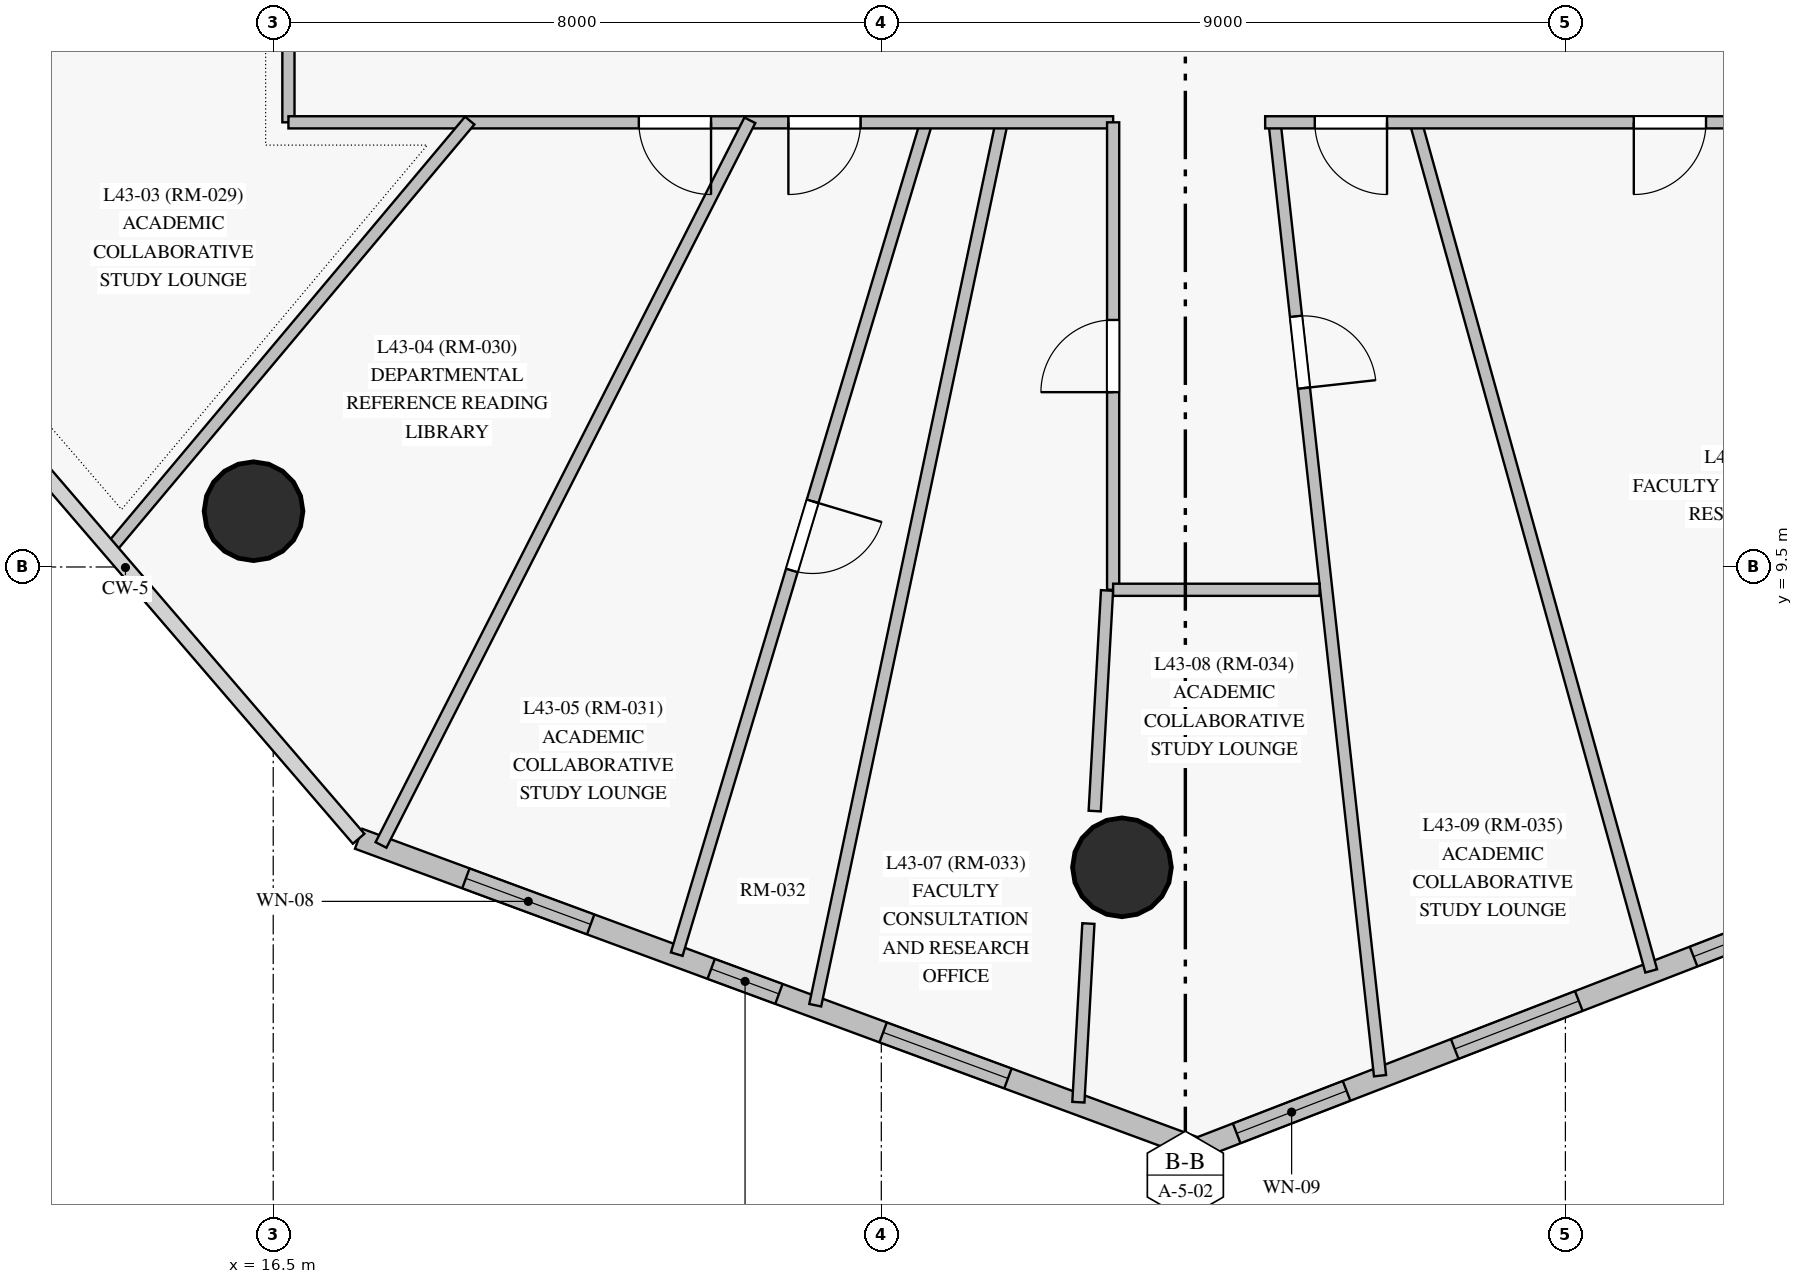
"""IFC4 building model, lengths in metres.
Left out: names, types, materials, properties, quantities, classifications, styles, units other than length and angle.
Written with IfcOpenShell. Run it as: python <this file> out.ifc"""

import sys

from ifc_helpers import new_model, si_unit, direction, frame, frame_2d, origin, origin_with_axes, origin_2d, place, context, subcontext, project, spatial, rectangle, circle, extrude, source, transform, mapped, element, fill, save


model = new_model("IFC4")
c1 = context("Model", 3, precision=1e-05, world=origin(), true_north=direction((0.0, 1.0)))
c2 = subcontext(c1, "Body", "Model", "MODEL_VIEW")
j1 = project(units=[si_unit("LENGTHUNIT", "METRE"), si_unit("PLANEANGLEUNIT", "RADIAN")], contexts=[c1])
p1 = place(None, origin())
s1 = spatial("IfcSite", under=j1, at=p1, CompositionType="ELEMENT")
p2 = place(p1, origin())
s2 = spatial("IfcBuilding", under=s1, at=p2, CompositionType="ELEMENT")
p3 = place(p2, frame((0.0, 0.0, 152.55)))
s3 = spatial("IfcBuildingStorey", under=s2, at=p3, CompositionType="ELEMENT", Elevation=152.55)
m1 = source(origin_with_axes(), c2, "Body", "SweptSolid", [
    extrude(circle(Radius=0.65, at=origin_2d()), origin(), (0.0, 0.0, 1.0), 4.0),
])
for number, where, z_axis, x_axis in (
    (1, (16.241, 10.234, 0.0), (0.0, 0.0, 1.0), (1.0, 0.0, 0.0)),
    (2, (27.666, 5.549, 0.0), (0.0, 0.0, 1.0), (1.0, 0.0, 0.0)),
):
    element("IfcColumn", number, at=place(p3, frame(where, z_axis=z_axis, x_axis=x_axis)), inside=s3, PredefinedType="COLUMN", context=c2, shape_type="MappedRepresentation", body=[
        mapped(m1, transform((0.0, 0.0, 0.0), scale=1.0)),
    ])
p4 = place(p3, frame((17.624, 5.925, 0.0), z_axis=(0.0, 0.0, 1.0), x_axis=(0.938113692387, -0.346327446436, 0.0)))
e3 = element("IfcWall", 3, at=p4, inside=s3, PredefinedType="SOLIDWALL", context=c2, shape_type="SweptSolid", body=[
    extrude(rectangle(XDim=11.765, YDim=0.28, at=frame_2d((5.883, 0.0))), origin(), (0.0, 0.0, 1.0), 3.775),
])
p5 = place(p4, frame((1.504, 0.0, 0.85)))
e4 = element("IfcOpeningElement", 4, at=p5, cuts=e3, PredefinedType="OPENING", context=c2, shape_type="SweptSolid", body=[
    extrude(rectangle(XDim=1.75, YDim=1.65, at=frame_2d((0.875, 0.825))), frame((0.0, 0.15, 0.0), z_axis=(0.0, -1.0, 0.0), x_axis=(1.0, 0.0, 0.0)), (0.0, 0.0, 1.0), 0.3),
])
p6 = place(p4, frame((4.944, 0.0, 0.85)))
e5 = element("IfcOpeningElement", 5, at=p6, cuts=e3, PredefinedType="OPENING", context=c2, shape_type="SweptSolid", body=[
    extrude(rectangle(XDim=0.95, YDim=1.5, at=frame_2d((0.475, 0.75))), frame((0.0, 0.15, 0.0), z_axis=(0.0, -1.0, 0.0), x_axis=(1.0, 0.0, 0.0)), (0.0, 0.0, 1.0), 0.3),
])
p7 = place(p4, frame((7.356, 0.0, 0.85)))
e6 = element("IfcOpeningElement", 6, at=p7, cuts=e3, PredefinedType="OPENING", context=c2, shape_type="SweptSolid", body=[
    extrude(rectangle(XDim=1.75, YDim=1.65, at=frame_2d((0.875, 0.825))), frame((0.0, 0.15, 0.0), z_axis=(0.0, -1.0, 0.0), x_axis=(1.0, 0.0, 0.0)), (0.0, 0.0, 1.0), 0.3),
])
p8 = place(p3, frame((28.661, 1.85, 0.0), z_axis=(0.0, 0.0, 1.0), x_axis=(0.93264769039, 0.360788422223, 0.0)))
e7 = element("IfcWall", 7, at=p8, inside=s3, PredefinedType="SOLIDWALL", context=c2, shape_type="SweptSolid", body=[
    extrude(rectangle(XDim=9.391, YDim=0.28, at=frame_2d((4.696, 0.0))), origin(), (0.0, 0.0, 1.0), 3.775),
])
p9 = place(p8, frame((0.552, 0.0, 0.85)))
e8 = element("IfcOpeningElement", 8, at=p9, cuts=e7, PredefinedType="OPENING", context=c2, shape_type="SweptSolid", body=[
    extrude(rectangle(XDim=1.55, YDim=1.65, at=frame_2d((0.775, 0.825))), frame((0.0, 0.15, 0.0), z_axis=(0.0, -1.0, 0.0), x_axis=(1.0, 0.0, 0.0)), (0.0, 0.0, 1.0), 0.3),
])
p10 = place(p8, frame((3.627, 0.0, 0.85)))
e9 = element("IfcOpeningElement", 9, at=p10, cuts=e7, PredefinedType="OPENING", context=c2, shape_type="SweptSolid", body=[
    extrude(rectangle(XDim=1.75, YDim=1.65, at=frame_2d((0.875, 0.825))), frame((0.0, 0.15, 0.0), z_axis=(0.0, -1.0, 0.0), x_axis=(1.0, 0.0, 0.0)), (0.0, 0.0, 1.0), 0.3),
])
p11 = place(p8, frame((6.997, 0.0, 0.85)))
e10 = element("IfcOpeningElement", 10, at=p11, cuts=e7, PredefinedType="OPENING", context=c2, shape_type="SweptSolid", body=[
    extrude(rectangle(XDim=1.75, YDim=1.65, at=frame_2d((0.875, 0.825))), frame((0.0, 0.15, 0.0), z_axis=(0.0, -1.0, 0.0), x_axis=(1.0, 0.0, 0.0)), (0.0, 0.0, 1.0), 0.3),
])
p12 = place(p3, frame((16.7, 15.35, 0.0), z_axis=(0.0, 0.0, 1.0), x_axis=(0.0, 1.0, 0.0)))
e11 = element("IfcWall", 11, at=p12, inside=s3, PredefinedType="PARTITIONING", context=c2, shape_type="SweptSolid", body=[
    extrude(rectangle(XDim=22.3, YDim=0.16, at=frame_2d((11.15, 0.0))), origin(), (0.0, 0.0, 1.0), 2.975),
])
p13 = place(p12, frame((7.33, 0.0, 0.0)))
e12 = element("IfcOpeningElement", 12, at=p13, cuts=e11, PredefinedType="OPENING", context=c2, shape_type="SweptSolid", body=[
    extrude(rectangle(XDim=0.95, YDim=2.15, at=frame_2d((0.475, 1.075))), frame((0.0, 0.09, 0.0), z_axis=(0.0, -1.0, 0.0), x_axis=(1.0, 0.0, 0.0)), (0.0, 0.0, 1.0), 0.18),
])
p14 = place(p12, frame((5.1, 0.0, 0.0)))
e13 = element("IfcOpeningElement", 13, at=p14, cuts=e11, PredefinedType="OPENING", context=c2, shape_type="SweptSolid", body=[
    extrude(rectangle(XDim=0.96, YDim=2.15, at=frame_2d((0.48, 1.075))), frame((0.0, 0.09, 0.0), z_axis=(0.0, -1.0, 0.0), x_axis=(1.0, 0.0, 0.0)), (0.0, 0.0, 1.0), 0.18),
])
p15 = place(p12, frame((1.328, 0.0, 0.0)))
e14 = element("IfcOpeningElement", 14, at=p15, cuts=e11, PredefinedType="OPENING", context=c2, shape_type="SweptSolid", body=[
    extrude(rectangle(XDim=0.95, YDim=2.15, at=frame_2d((0.475, 1.075))), frame((0.0, 0.09, 0.0), z_axis=(0.0, -1.0, 0.0), x_axis=(1.0, 0.0, 0.0)), (0.0, 0.0, 1.0), 0.18),
])
p16 = place(p12, frame((14.02, 0.0, 0.0)))
e15 = element("IfcOpeningElement", 15, at=p16, cuts=e11, PredefinedType="OPENING", context=c2, shape_type="SweptSolid", body=[
    extrude(rectangle(XDim=0.95, YDim=2.15, at=frame_2d((0.475, 1.075))), frame((0.0, 0.09, 0.0), z_axis=(0.0, -1.0, 0.0), x_axis=(1.0, 0.0, 0.0)), (0.0, 0.0, 1.0), 0.18),
])
p17 = place(p3, frame((29.67, 15.38, 0.0), z_axis=(0.0, 0.0, 1.0), x_axis=(0.109978172038, -0.993934002676, 0.0)))
e16 = element("IfcWall", 16, at=p17, inside=s3, PredefinedType="PARTITIONING", context=c2, shape_type="SweptSolid", body=[
    extrude(rectangle(XDim=12.649, YDim=0.16, at=frame_2d((6.324, 0.0))), origin(), (0.0, 0.0, 1.0), 3.775),
])
p18 = place(p17, frame((2.598, 0.0, 0.0)))
e17 = element("IfcOpeningElement", 17, at=p18, cuts=e16, PredefinedType="OPENING", context=c2, shape_type="SweptSolid", body=[
    extrude(rectangle(XDim=0.95, YDim=2.15, at=frame_2d((0.475, 1.075))), frame((0.0, 0.09, 0.0), z_axis=(0.0, -1.0, 0.0), x_axis=(1.0, 0.0, 0.0)), (0.0, 0.0, 1.0), 0.18),
])
p19 = place(p3, frame((26.09, 15.379, 0.0), z_axis=(0.0, 0.0, 1.0), x_axis=(-0.206629699735, -0.978419218529, 0.0)))
e18 = element("IfcWall", 18, at=p19, inside=s3, PredefinedType="PARTITIONING", context=c2, shape_type="SweptSolid", body=[
    extrude(rectangle(XDim=11.902, YDim=0.16, at=frame_2d((5.951, 0.0))), origin(), (0.0, 0.0, 1.0), 3.775),
])
p20 = place(p3, frame((31.523, 15.379, 0.0), z_axis=(0.0, 0.0, 1.0), x_axis=(0.267345748254, -0.963600669827, 0.0)))
e19 = element("IfcWall", 19, at=p20, inside=s3, PredefinedType="PARTITIONING", context=c2, shape_type="SweptSolid", body=[
    extrude(rectangle(XDim=11.616, YDim=0.16, at=frame_2d((5.808, 0.0))), origin(), (0.0, 0.0, 1.0), 3.775),
])
p21 = place(p3, frame((25.101, 15.379, 0.0), z_axis=(0.0, 0.0, 1.0), x_axis=(-0.287375259065, -0.957818072745, 0.0)))
e20 = element("IfcWall", 20, at=p21, inside=s3, PredefinedType="PARTITIONING", context=c2, shape_type="SweptSolid", body=[
    extrude(rectangle(XDim=11.455, YDim=0.16, at=frame_2d((5.728, 0.0))), origin(), (0.0, 0.0, 1.0), 3.775),
])
p22 = place(p21, frame((5.235, 0.0, 0.0)))
e21 = element("IfcOpeningElement", 21, at=p22, cuts=e20, PredefinedType="OPENING", context=c2, shape_type="SweptSolid", body=[
    extrude(rectangle(XDim=0.95, YDim=2.15, at=frame_2d((0.475, 1.075))), frame((0.0, 0.09, 0.0), z_axis=(0.0, -1.0, 0.0), x_axis=(1.0, 0.0, 0.0)), (0.0, 0.0, 1.0), 0.18),
])
p23 = place(p3, frame((27.55, 15.35, 0.0), z_axis=(0.0, 0.0, 1.0), x_axis=(-1.0, 0.0, 0.0)))
e22 = element("IfcWall", 22, at=p23, inside=s3, PredefinedType="PARTITIONING", context=c2, shape_type="SweptSolid", body=[
    extrude(rectangle(XDim=10.85, YDim=0.16, at=frame_2d((5.425, 0.0))), origin(), (0.0, 0.0, 1.0), 3.325),
])
p24 = place(p23, frame((5.29, 0.0, 0.0)))
e23 = element("IfcOpeningElement", 23, at=p24, cuts=e22, PredefinedType="OPENING", context=c2, shape_type="SweptSolid", body=[
    extrude(rectangle(XDim=0.95, YDim=2.15, at=frame_2d((0.475, 1.075))), frame((0.0, 0.09, 0.0), z_axis=(0.0, -1.0, 0.0), x_axis=(1.0, 0.0, 0.0)), (0.0, 0.0, 1.0), 0.18),
])
p25 = place(p23, frame((3.323, 0.0, 0.0)))
e24 = element("IfcOpeningElement", 24, at=p25, cuts=e22, PredefinedType="OPENING", context=c2, shape_type="SweptSolid", body=[
    extrude(rectangle(XDim=0.95, YDim=2.15, at=frame_2d((0.475, 1.075))), frame((0.0, 0.09, 0.0), z_axis=(0.0, -1.0, 0.0), x_axis=(1.0, 0.0, 0.0)), (0.0, 0.0, 1.0), 0.18),
])
p26 = place(p3, frame((22.771, 15.377, 0.0), z_axis=(0.0, 0.0, 1.0), x_axis=(-0.453637892893, -0.891186098484, 0.0)))
e25 = element("IfcWall", 25, at=p26, inside=s3, PredefinedType="PARTITIONING", context=c2, shape_type="SweptSolid", body=[
    extrude(rectangle(XDim=10.698, YDim=0.16, at=frame_2d((5.349, 0.0))), origin(), (0.0, 0.0, 1.0), 3.775),
])
p27 = place(p3, frame((40.2, 15.35, 0.0), z_axis=(0.0, 0.0, 1.0), x_axis=(-1.0, 0.0, 0.0)))
e26 = element("IfcWall", 26, at=p27, inside=s3, PredefinedType="PARTITIONING", context=c2, shape_type="SweptSolid", body=[
    extrude(rectangle(XDim=10.65, YDim=0.16, at=frame_2d((5.325, 0.0))), origin(), (0.0, 0.0, 1.0), 2.975),
])
p28 = place(p27, frame((9.047, 0.0, 0.0)))
e27 = element("IfcOpeningElement", 27, at=p28, cuts=e26, PredefinedType="OPENING", context=c2, shape_type="SweptSolid", body=[
    extrude(rectangle(XDim=0.95, YDim=2.15, at=frame_2d((0.475, 1.075))), frame((0.0, 0.09, 0.0), z_axis=(0.0, -1.0, 0.0), x_axis=(1.0, 0.0, 0.0)), (0.0, 0.0, 1.0), 0.18),
])
p29 = place(p27, frame((4.85, 0.0, 0.0)))
e28 = element("IfcOpeningElement", 28, at=p29, cuts=e26, PredefinedType="OPENING", context=c2, shape_type="SweptSolid", body=[
    extrude(rectangle(XDim=0.95, YDim=2.15, at=frame_2d((0.475, 1.075))), frame((0.0, 0.09, 0.0), z_axis=(0.0, -1.0, 0.0), x_axis=(1.0, 0.0, 0.0)), (0.0, 0.0, 1.0), 0.18),
])
p30 = place(p3, frame((19.085, 15.373, 0.0), z_axis=(0.0, 0.0, 1.0), x_axis=(-0.642788640308, -0.766043578324, 0.0)))
e29 = element("IfcWall", 29, at=p30, inside=s3, PredefinedType="PARTITIONING", context=c2, shape_type="SweptSolid", body=[
    extrude(rectangle(XDim=7.339, YDim=0.16, at=frame_2d((3.669, 0.0))), origin(), (0.0, 0.0, 1.0), 2.975),
])
p31 = place(p3, frame((16.726, 19.243, 0.0), z_axis=(0.0, 0.0, 1.0), x_axis=(-0.849038090378, -0.528331639301, 0.0)))
e30 = element("IfcWall", 30, at=p31, inside=s3, PredefinedType="PARTITIONING", context=c2, shape_type="SweptSolid", body=[
    extrude(rectangle(XDim=6.967, YDim=0.16, at=frame_2d((3.483, 0.0))), origin(), (0.0, 0.0, 1.0), 3.775),
])
p32 = place(p3, frame((27.55, 9.2, 0.0), z_axis=(0.0, 0.0, 1.0), x_axis=(0.0, 1.0, 0.0)))
e31 = element("IfcWall", 31, at=p32, inside=s3, PredefinedType="PARTITIONING", context=c2, shape_type="SweptSolid", body=[
    extrude(rectangle(XDim=6.15, YDim=0.16, at=frame_2d((3.075, 0.0))), origin(), (0.0, 0.0, 1.0), 2.975),
])
p33 = place(p32, frame((2.6, 0.0, 0.0)))
e32 = element("IfcOpeningElement", 32, at=p33, cuts=e31, PredefinedType="OPENING", context=c2, shape_type="SweptSolid", body=[
    extrude(rectangle(XDim=0.95, YDim=2.15, at=frame_2d((0.475, 1.075))), frame((0.0, 0.09, 0.0), z_axis=(0.0, -1.0, 0.0), x_axis=(1.0, 0.0, 0.0)), (0.0, 0.0, 1.0), 0.18),
])
p34 = place(p3, frame((27.47, 9.191, 0.0), z_axis=(0.0, 0.0, 1.0), x_axis=(-0.0559398618, -0.998434139972, 0.0)))
e33 = element("IfcWall", 33, at=p34, inside=s3, PredefinedType="PARTITIONING", context=c2, shape_type="SweptSolid", body=[
    extrude(rectangle(XDim=2.907, YDim=0.16, at=frame_2d((1.453, 0.0))), origin(), (0.0, 0.0, 1.0), 2.975),
])
p35 = place(p3, frame((27.224, 4.809, 0.0), z_axis=(0.0, 0.0, 1.0), x_axis=(-0.055900818541, -0.998436326706, 0.0)))
e34 = element("IfcWall", 34, at=p35, inside=s3, PredefinedType="PARTITIONING", context=c2, shape_type="SweptSolid", body=[
    extrude(rectangle(XDim=2.354, YDim=0.16, at=frame_2d((1.177, 0.0))), origin(), (0.0, 0.0, 1.0), 3.775),
])
p36 = place(p3, frame((30.266, 9.2, 0.0), z_axis=(0.0, 0.0, 1.0), x_axis=(-1.0, 0.0, 0.0)))
e35 = element("IfcWall", 35, at=p36, inside=s3, PredefinedType="PARTITIONING", context=c2, shape_type="SweptSolid", body=[
    extrude(rectangle(XDim=2.716, YDim=0.16, at=frame_2d((1.358, 0.0))), origin(), (0.0, 0.0, 1.0), 3.445),
])
m2 = source(origin_with_axes(), c2, "Body", "SweptSolid", [
    extrude(rectangle(XDim=1.75, YDim=1.65, at=frame_2d((0.875, 0.825))), frame((0.0, 0.03, 0.0), z_axis=(0.0, -1.0, 0.0), x_axis=(1.0, 0.0, 0.0)), (0.0, 0.0, 1.0), 0.06),
])
p37 = place(p5, origin())
e36 = element("IfcWindow", 36, at=p37, inside=s3, PartitioningType="SINGLE_PANEL", PredefinedType="WINDOW", context=c2, shape_type="MappedRepresentation", body=[
    mapped(m2, transform((0.0, 0.0, 0.0), scale=1.0)),
])
fill(e4, e36)
m3 = source(origin_with_axes(), c2, "Body", "SweptSolid", [
    extrude(rectangle(XDim=0.95, YDim=1.5, at=frame_2d((0.475, 0.75))), frame((0.0, 0.03, 0.0), z_axis=(0.0, -1.0, 0.0), x_axis=(1.0, 0.0, 0.0)), (0.0, 0.0, 1.0), 0.06),
])
p38 = place(p6, origin())
e37 = element("IfcWindow", 37, at=p38, inside=s3, PartitioningType="SINGLE_PANEL", PredefinedType="WINDOW", context=c2, shape_type="MappedRepresentation", body=[
    mapped(m3, transform((0.0, 0.0, 0.0), scale=1.0)),
])
fill(e5, e37)
p39 = place(p7, origin())
e38 = element("IfcWindow", 38, at=p39, inside=s3, PartitioningType="SINGLE_PANEL", PredefinedType="WINDOW", context=c2, shape_type="MappedRepresentation", body=[
    mapped(m2, transform((0.0, 0.0, 0.0), scale=1.0)),
])
fill(e6, e38)
m4 = source(origin_with_axes(), c2, "Body", "SweptSolid", [
    extrude(rectangle(XDim=1.55, YDim=1.65, at=frame_2d((0.775, 0.825))), frame((0.0, 0.03, 0.0), z_axis=(0.0, -1.0, 0.0), x_axis=(1.0, 0.0, 0.0)), (0.0, 0.0, 1.0), 0.06),
])
p40 = place(p9, origin())
e39 = element("IfcWindow", 39, at=p40, inside=s3, PartitioningType="SINGLE_PANEL", PredefinedType="WINDOW", context=c2, shape_type="MappedRepresentation", body=[
    mapped(m4, transform((0.0, 0.0, 0.0), scale=1.0)),
])
fill(e8, e39)
p41 = place(p10, origin())
e40 = element("IfcWindow", 40, at=p41, inside=s3, PartitioningType="SINGLE_PANEL", PredefinedType="WINDOW", context=c2, shape_type="MappedRepresentation", body=[
    mapped(m2, transform((0.0, 0.0, 0.0), scale=1.0)),
])
fill(e9, e40)
p42 = place(p11, origin())
e41 = element("IfcWindow", 41, at=p42, inside=s3, PartitioningType="SINGLE_PANEL", PredefinedType="WINDOW", context=c2, shape_type="MappedRepresentation", body=[
    mapped(m2, transform((0.0, 0.0, 0.0), scale=1.0)),
])
fill(e10, e41)
m5 = source(origin_with_axes(), c2, "Body", "SweptSolid", [
    extrude(rectangle(XDim=0.95, YDim=2.15, at=frame_2d((0.475, 1.075))), frame((0.0, 0.025, 0.0), z_axis=(0.0, -1.0, 0.0), x_axis=(1.0, 0.0, 0.0)), (0.0, 0.0, 1.0), 0.05),
])
p43 = place(p24, origin())
e42 = element("IfcDoor", 42, at=p43, inside=s3, OperationType="SINGLE_SWING_LEFT", PredefinedType="DOOR", context=c2, shape_type="MappedRepresentation", body=[
    mapped(m5, transform((0.0, 0.0, 0.0), scale=1.0)),
])
fill(e23, e42)
p44 = place(p25, origin())
e43 = element("IfcDoor", 43, at=p44, inside=s3, OperationType="SINGLE_SWING_RIGHT", PredefinedType="DOOR", context=c2, shape_type="MappedRepresentation", body=[
    mapped(m5, transform((0.0, 0.0, 0.0), scale=1.0)),
])
fill(e24, e43)
p45 = place(p33, origin())
e44 = element("IfcDoor", 44, at=p45, inside=s3, OperationType="SINGLE_SWING_LEFT", PredefinedType="DOOR", context=c2, shape_type="MappedRepresentation", body=[
    mapped(m5, transform((0.0, 0.0, 0.0), scale=1.0)),
])
fill(e32, e44)
p46 = place(p18, origin())
e45 = element("IfcDoor", 45, at=p46, inside=s3, OperationType="SINGLE_SWING_RIGHT", PredefinedType="DOOR", context=c2, shape_type="MappedRepresentation", body=[
    mapped(m5, transform((0.0, 0.0, 0.0), scale=1.0)),
])
fill(e17, e45)
p47 = place(p28, origin())
e46 = element("IfcDoor", 46, at=p47, inside=s3, OperationType="SINGLE_SWING_LEFT", PredefinedType="DOOR", context=c2, shape_type="MappedRepresentation", body=[
    mapped(m5, transform((0.0, 0.0, 0.0), scale=1.0)),
])
fill(e27, e46)
p48 = place(p29, origin())
e47 = element("IfcDoor", 47, at=p48, inside=s3, OperationType="SINGLE_SWING_RIGHT", PredefinedType="DOOR", context=c2, shape_type="MappedRepresentation", body=[
    mapped(m5, transform((0.0, 0.0, 0.0), scale=1.0)),
])
fill(e28, e47)
p49 = place(p22, origin())
e48 = element("IfcDoor", 48, at=p49, inside=s3, OperationType="SINGLE_SWING_LEFT", PredefinedType="DOOR", context=c2, shape_type="MappedRepresentation", body=[
    mapped(m5, transform((0.0, 0.0, 0.0), scale=1.0)),
])
fill(e21, e48)
save(model, sys.argv[1])
